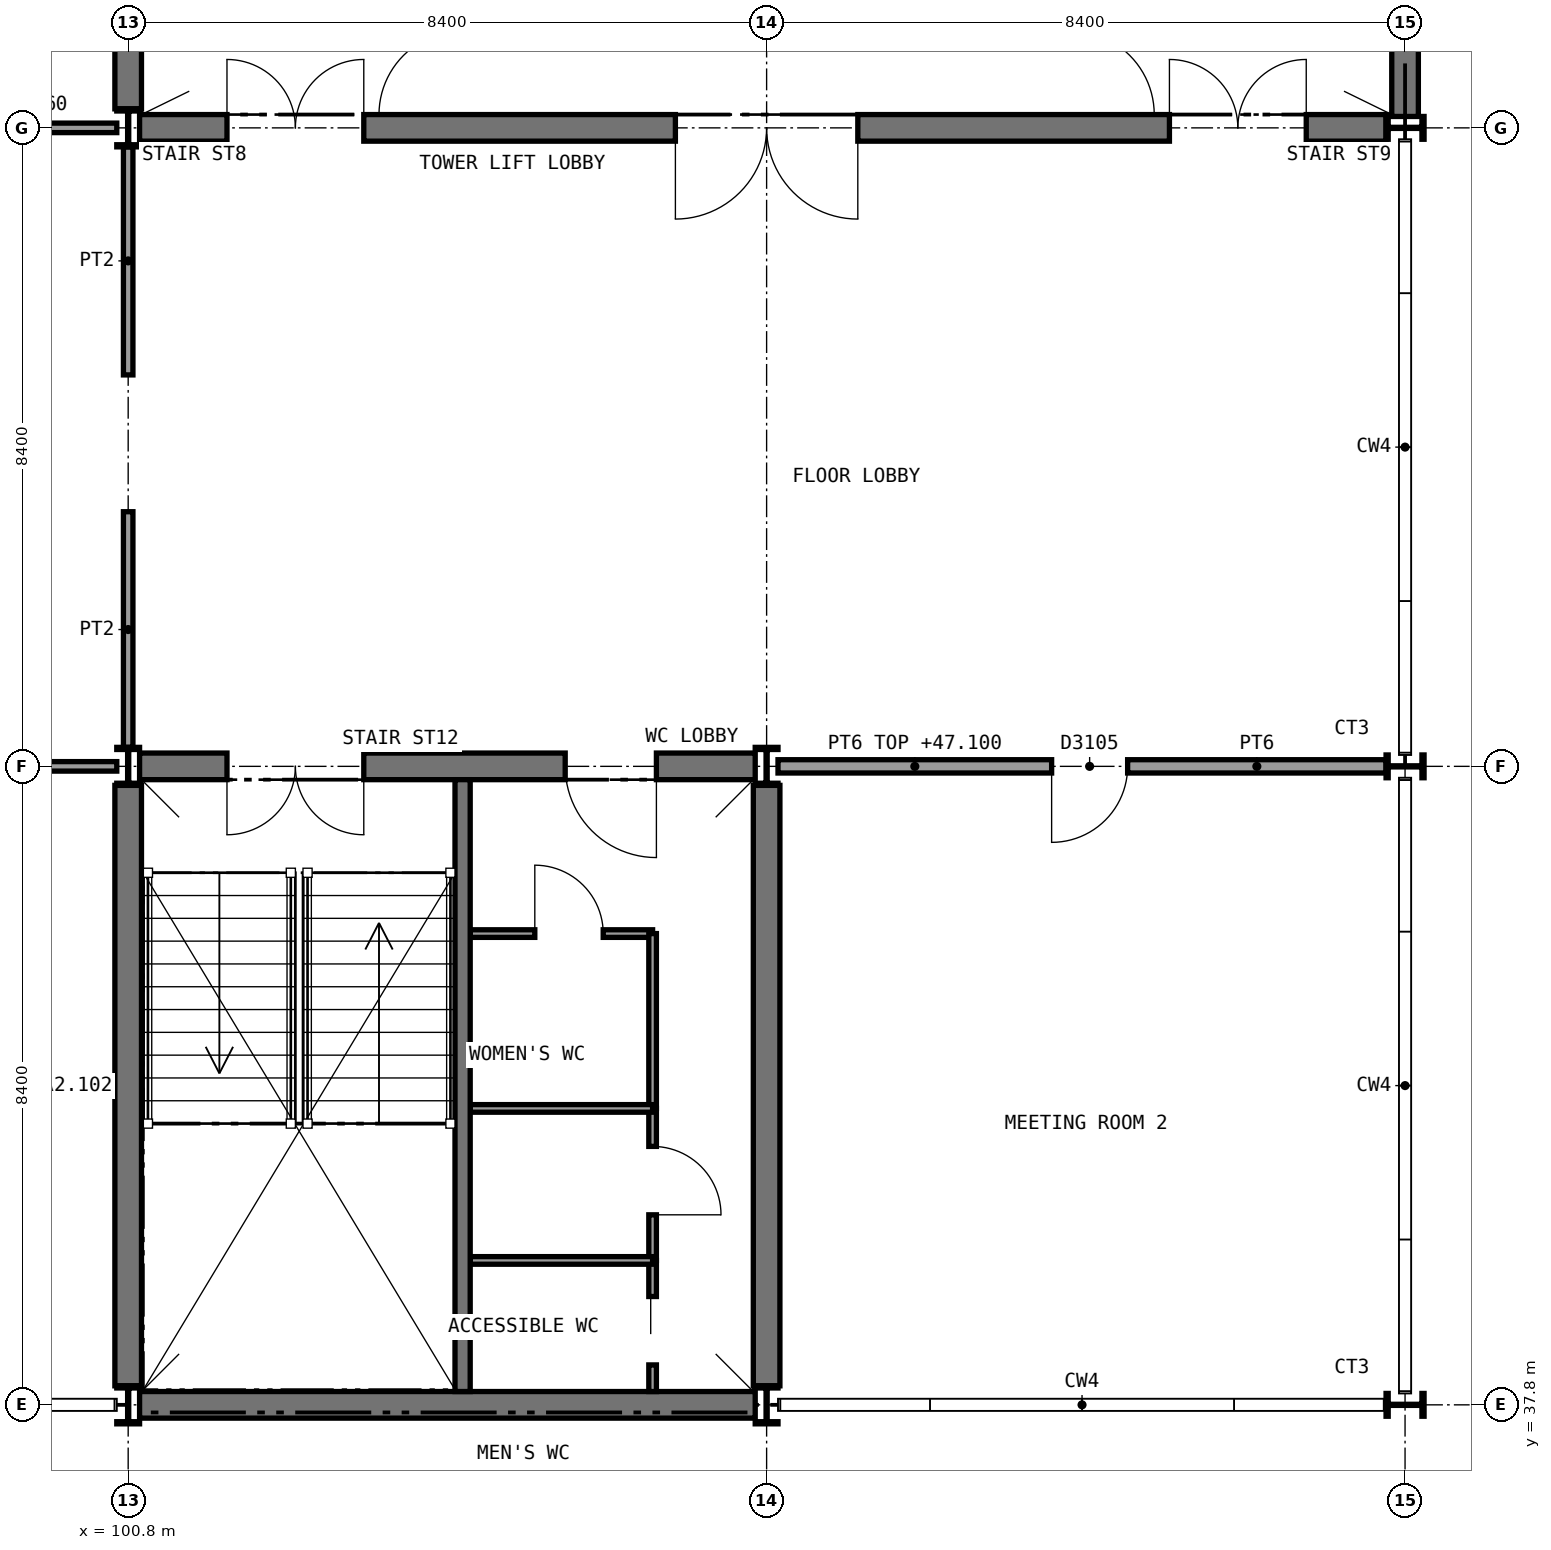
"""IFC4 building model, lengths in metres.
Left out: names, types, materials, properties, quantities, classifications, styles, units other than length and angle.
Written with IfcOpenShell. Run it as: python <this file> out.ifc"""

import sys

from ifc_helpers import new_model, si_unit, direction, frame, frame_2d, origin, origin_2d, place, context, subcontext, project, spatial, rectangle, i_section, extrude, element, fill, save


model = new_model("IFC4")
c1 = context("Model", 3, precision=1e-05, world=origin(), true_north=direction((0.0, 1.0)))
c2 = subcontext(c1, "Body", "Model", "MODEL_VIEW")
j1 = project(units=[si_unit("LENGTHUNIT", "METRE"), si_unit("PLANEANGLEUNIT", "RADIAN")], contexts=[c1])
p1 = place(None, origin())
s1 = spatial("IfcSite", under=j1, at=p1, CompositionType="ELEMENT")
p2 = place(p1, origin())
s2 = spatial("IfcBuilding", under=s1, at=p2, CompositionType="ELEMENT")
p3 = place(p2, frame((0.0, 0.0, 43.6)))
s3 = spatial("IfcBuildingStorey", under=s2, at=p3, CompositionType="ELEMENT", Elevation=43.6)
p4 = place(p3, frame((100.95, 54.6, 0.0), z_axis=(0.0, 0.0, 1.0), x_axis=(1.0, 0.0, 0.0)))
e1 = element("IfcWall", 1, at=p4, inside=s3, PredefinedType="SHEAR", context=c2, shape_type="SweptSolid", body=[
    extrude(rectangle(XDim=16.4, YDim=0.35, at=frame_2d((8.2, 0.0))), origin(), (0.0, 0.0, 1.0), 3.85),
])
p5 = place(p4, frame((1.15, 0.0, 0.0)))
e2 = element("IfcOpeningElement", 2, at=p5, cuts=e1, PredefinedType="OPENING", context=c2, shape_type="SweptSolid", body=[
    extrude(rectangle(XDim=1.8, YDim=2.1, at=frame_2d((0.9, 1.05))), frame((0.0, 0.185, 0.0), z_axis=(0.0, -1.0, 0.0), x_axis=(1.0, 0.0, 0.0)), (0.0, 0.0, 1.0), 0.37),
])
p6 = place(p4, frame((13.55, 0.0, 0.0)))
e3 = element("IfcOpeningElement", 3, at=p6, cuts=e1, PredefinedType="OPENING", context=c2, shape_type="SweptSolid", body=[
    extrude(rectangle(XDim=1.8, YDim=2.1, at=frame_2d((0.9, 1.05))), frame((0.0, 0.185, 0.0), z_axis=(0.0, -1.0, 0.0), x_axis=(1.0, 0.0, 0.0)), (0.0, 0.0, 1.0), 0.37),
])
p7 = place(p4, frame((7.05, 0.0, 0.0)))
e4 = element("IfcOpeningElement", 4, at=p7, cuts=e1, PredefinedType="OPENING", context=c2, shape_type="SweptSolid", body=[
    extrude(rectangle(XDim=2.4, YDim=2.4, at=frame_2d((1.2, 1.2))), frame((0.0, 0.185, 0.0), z_axis=(0.0, -1.0, 0.0), x_axis=(1.0, 0.0, 0.0)), (0.0, 0.0, 1.0), 0.37),
])
p8 = place(p3, frame((100.8, 54.85, 0.0), z_axis=(0.0, 0.0, 1.0), x_axis=(0.0, 1.0, 0.0)))
e5 = element("IfcWall", 5, at=p8, inside=s3, PredefinedType="SHEAR", context=c2, shape_type="SweptSolid", body=[
    extrude(rectangle(XDim=7.9, YDim=0.35, at=frame_2d((3.95, 0.0))), origin(), (0.0, 0.0, 1.0), 3.85),
])
for number, where, z_axis, x_axis in (
    (6, (117.6, 54.75, 0.0), (0.0, 0.0, 1.0), (0.0, 1.0, 0.0)),
    (7, (100.95, 37.8, 0.0), (0.0, 0.0, 1.0), (1.0, 0.0, 0.0)),
):
    element("IfcWall", number, at=place(p3, frame(where, z_axis=z_axis, x_axis=x_axis)), inside=s3, PredefinedType="SHEAR", context=c2, shape_type="SweptSolid", body=[
        extrude(rectangle(XDim=8.1, YDim=0.35, at=frame_2d((4.05, 0.0))), origin(), (0.0, 0.0, 1.0), 3.85),
    ])
p9 = place(p3, frame((100.95, 46.2, 0.0), z_axis=(0.0, 0.0, 1.0), x_axis=(1.0, 0.0, 0.0)))
e8 = element("IfcWall", 8, at=p9, inside=s3, PredefinedType="SHEAR", context=c2, shape_type="SweptSolid", body=[
    extrude(rectangle(XDim=8.1, YDim=0.35, at=frame_2d((4.05, 0.0))), origin(), (0.0, 0.0, 1.0), 3.85),
])
p10 = place(p9, frame((1.15, 0.0, 0.0)))
e9 = element("IfcOpeningElement", 9, at=p10, cuts=e8, PredefinedType="OPENING", context=c2, shape_type="SweptSolid", body=[
    extrude(rectangle(XDim=1.8, YDim=2.1, at=frame_2d((0.9, 1.05))), frame((0.0, 0.185, 0.0), z_axis=(0.0, -1.0, 0.0), x_axis=(1.0, 0.0, 0.0)), (0.0, 0.0, 1.0), 0.37),
])
p11 = place(p9, frame((5.6, 0.0, 0.0)))
e10 = element("IfcOpeningElement", 10, at=p11, cuts=e8, PredefinedType="OPENING", context=c2, shape_type="SweptSolid", body=[
    extrude(rectangle(XDim=1.2, YDim=2.1, at=frame_2d((0.6, 1.05))), frame((0.0, 0.185, 0.0), z_axis=(0.0, -1.0, 0.0), x_axis=(1.0, 0.0, 0.0)), (0.0, 0.0, 1.0), 0.37),
])
for number, where, z_axis, x_axis in (
    (11, (100.8, 38.05, 0.0), (0.0, 0.0, 1.0), (0.0, 1.0, 0.0)),
    (12, (109.2, 38.05, 0.0), (0.0, 0.0, 1.0), (0.0, 1.0, 0.0)),
):
    element("IfcWall", number, at=place(p3, frame(where, z_axis=z_axis, x_axis=x_axis)), inside=s3, PredefinedType="SHEAR", context=c2, shape_type="SweptSolid", body=[
        extrude(rectangle(XDim=7.9, YDim=0.35, at=frame_2d((3.95, 0.0))), origin(), (0.0, 0.0, 1.0), 3.85),
    ])
for number, where, z_axis, x_axis in (
    (13, (100.8, 37.8, 0.0), (0.0, 0.0, 1.0), (1.0, 0.0, 0.0)),
    (14, (100.8, 46.2, 0.0), (0.0, 0.0, 1.0), (1.0, 0.0, 0.0)),
    (15, (100.8, 54.6, 0.0), (0.0, 0.0, 1.0), (1.0, 0.0, 0.0)),
    (16, (109.2, 37.8, 0.0), (0.0, 0.0, 1.0), (1.0, 0.0, 0.0)),
    (17, (109.2, 46.2, 0.0), (0.0, 0.0, 1.0), (1.0, 0.0, 0.0)),
    (18, (117.6, 37.8, 0.0), (0.0, 0.0, 1.0), (0.0, 1.0, 0.0)),
    (19, (117.6, 46.2, 0.0), (0.0, 0.0, 1.0), (0.0, 1.0, 0.0)),
    (20, (117.6, 54.6, 0.0), (0.0, 0.0, 1.0), (0.0, 1.0, 0.0)),
):
    element("IfcColumn", number, at=place(p3, frame(where, z_axis=z_axis, x_axis=x_axis)), inside=s3, PredefinedType="COLUMN", context=c2, shape_type="SweptSolid", body=[
        extrude(i_section(OverallWidth=0.3, OverallDepth=0.5, WebThickness=0.014, FlangeThickness=0.028, FilletRadius=0.027, at=origin_2d()), origin(), (0.0, 0.0, 1.0), 4.0),
    ])
p12 = place(p3, frame((105.3, 44.0, 0.0), z_axis=(0.0, 0.0, 1.0), x_axis=(1.0, 0.0, 0.0)))
e21 = element("IfcWall", 21, at=p12, inside=s3, PredefinedType="PARTITIONING", context=c2, shape_type="SweptSolid", body=[
    extrude(rectangle(XDim=2.4, YDim=0.1, at=frame_2d((1.2, 0.0))), origin(), (0.0, 0.0, 1.0), 3.78),
])
p13 = place(p12, frame((0.85, 0.0, 0.0)))
e22 = element("IfcOpeningElement", 22, at=p13, cuts=e21, PredefinedType="OPENING", context=c2, shape_type="SweptSolid", body=[
    extrude(rectangle(XDim=0.9, YDim=2.1, at=frame_2d((0.45, 1.05))), frame((0.0, 0.06, 0.0), z_axis=(0.0, -1.0, 0.0), x_axis=(1.0, 0.0, 0.0)), (0.0, 0.0, 1.0), 0.12),
])
p14 = place(p3, frame((107.7, 41.7, 0.0), z_axis=(0.0, 0.0, 1.0), x_axis=(0.0, 1.0, 0.0)))
e23 = element("IfcWall", 23, at=p14, inside=s3, PredefinedType="PARTITIONING", context=c2, shape_type="SweptSolid", body=[
    extrude(rectangle(XDim=2.3, YDim=0.1, at=frame_2d((1.15, 0.0))), origin(), (0.0, 0.0, 1.0), 3.78),
])
p15 = place(p3, frame((107.7, 39.7, 0.0), z_axis=(0.0, 0.0, 1.0), x_axis=(0.0, 1.0, 0.0)))
e24 = element("IfcWall", 24, at=p15, inside=s3, PredefinedType="PARTITIONING", context=c2, shape_type="SweptSolid", body=[
    extrude(rectangle(XDim=2.0, YDim=0.1, at=frame_2d((1.0, 0.0))), origin(), (0.0, 0.0, 1.0), 3.78),
])
p16 = place(p15, frame((0.6, 0.0, 0.0)))
e25 = element("IfcOpeningElement", 25, at=p16, cuts=e24, PredefinedType="OPENING", context=c2, shape_type="SweptSolid", body=[
    extrude(rectangle(XDim=0.9, YDim=2.1, at=frame_2d((0.45, 1.05))), frame((0.0, 0.06, 0.0), z_axis=(0.0, -1.0, 0.0), x_axis=(1.0, 0.0, 0.0)), (0.0, 0.0, 1.0), 0.12),
])
p17 = place(p3, frame((107.7, 37.975, 0.0), z_axis=(0.0, 0.0, 1.0), x_axis=(0.0, 1.0, 0.0)))
e26 = element("IfcWall", 26, at=p17, inside=s3, PredefinedType="PARTITIONING", context=c2, shape_type="SweptSolid", body=[
    extrude(rectangle(XDim=1.725, YDim=0.1, at=frame_2d((0.862, 0.0))), origin(), (0.0, 0.0, 1.0), 3.78),
])
p18 = place(p17, frame((0.35, 0.0, 0.0)))
e27 = element("IfcOpeningElement", 27, at=p18, cuts=e26, PredefinedType="OPENING", context=c2, shape_type="SweptSolid", body=[
    extrude(rectangle(XDim=0.9, YDim=2.1, at=frame_2d((0.45, 1.05))), frame((0.0, 0.06, 0.0), z_axis=(0.0, -1.0, 0.0), x_axis=(1.0, 0.0, 0.0)), (0.0, 0.0, 1.0), 0.12),
])
for number, where, z_axis, x_axis in (
    (28, (105.3, 41.7, 0.0), (0.0, 0.0, 1.0), (1.0, 0.0, 0.0)),
    (29, (105.3, 39.7, 0.0), (0.0, 0.0, 1.0), (1.0, 0.0, 0.0)),
):
    element("IfcWall", number, at=place(p3, frame(where, z_axis=z_axis, x_axis=x_axis)), inside=s3, PredefinedType="PARTITIONING", context=c2, shape_type="SweptSolid", body=[
        extrude(rectangle(XDim=2.4, YDim=0.1, at=frame_2d((1.2, 0.0))), origin(), (0.0, 0.0, 1.0), 3.78),
    ])
p19 = place(p3, frame((92.55, 46.2, 0.0), z_axis=(0.0, 0.0, 1.0), x_axis=(1.0, 0.0, 0.0)))
e30 = element("IfcWall", 30, at=p19, inside=s3, PredefinedType="PARTITIONING", context=c2, shape_type="SweptSolid", body=[
    extrude(rectangle(XDim=8.1, YDim=0.125, at=frame_2d((4.05, 0.0))), origin(), (0.0, 0.0, 1.0), 3.5),
])
p20 = place(p19, frame((3.1, 0.0, 0.0)))
e31 = element("IfcOpeningElement", 31, at=p20, cuts=e30, PredefinedType="OPENING", context=c2, shape_type="SweptSolid", body=[
    extrude(rectangle(XDim=1.8, YDim=2.1, at=frame_2d((0.9, 1.05))), frame((0.0, 0.073, 0.0), z_axis=(0.0, -1.0, 0.0), x_axis=(1.0, 0.0, 0.0)), (0.0, 0.0, 1.0), 0.145),
])
p21 = place(p3, frame((109.35, 46.2, 0.0), z_axis=(0.0, 0.0, 1.0), x_axis=(1.0, 0.0, 0.0)))
e32 = element("IfcWall", 32, at=p21, inside=s3, PredefinedType="PARTITIONING", context=c2, shape_type="SweptSolid", body=[
    extrude(rectangle(XDim=8.0, YDim=0.175, at=frame_2d((4.0, 0.0))), origin(), (0.0, 0.0, 1.0), 3.5),
])
p22 = place(p21, frame((3.6, 0.0, 0.0)))
e33 = element("IfcOpeningElement", 33, at=p22, cuts=e32, PredefinedType="OPENING", context=c2, shape_type="SweptSolid", body=[
    extrude(rectangle(XDim=1.0, YDim=2.1, at=frame_2d((0.5, 1.05))), frame((0.0, 0.098, 0.0), z_axis=(0.0, -1.0, 0.0), x_axis=(1.0, 0.0, 0.0)), (0.0, 0.0, 1.0), 0.195),
])
p23 = place(p3, frame((100.8, 46.45, 0.0), z_axis=(0.0, 0.0, 1.0), x_axis=(0.0, 1.0, 0.0)))
e34 = element("IfcWall", 34, at=p23, inside=s3, PredefinedType="PARTITIONING", context=c2, shape_type="SweptSolid", body=[
    extrude(rectangle(XDim=3.1, YDim=0.125, at=frame_2d((1.55, 0.0))), origin(), (0.0, 0.0, 1.0), 3.5),
])
p24 = place(p3, frame((100.8, 51.35, 0.0), z_axis=(0.0, 0.0, 1.0), x_axis=(0.0, 1.0, 0.0)))
e35 = element("IfcWall", 35, at=p24, inside=s3, PredefinedType="PARTITIONING", context=c2, shape_type="SweptSolid", body=[
    extrude(rectangle(XDim=3.0, YDim=0.125, at=frame_2d((1.5, 0.0))), origin(), (0.0, 0.0, 1.0), 3.5),
])
p25 = place(p3, frame((92.55, 54.6, 0.0), z_axis=(0.0, 0.0, 1.0), x_axis=(1.0, 0.0, 0.0)))
e36 = element("IfcWall", 36, at=p25, inside=s3, PredefinedType="PARTITIONING", context=c2, shape_type="SweptSolid", body=[
    extrude(rectangle(XDim=8.1, YDim=0.125, at=frame_2d((4.05, 0.0))), origin(), (0.0, 0.0, 1.0), 3.56),
])
p26 = place(p25, frame((3.6, 0.0, 0.0)))
e37 = element("IfcOpeningElement", 37, at=p26, cuts=e36, PredefinedType="OPENING", context=c2, shape_type="SweptSolid", body=[
    extrude(rectangle(XDim=0.9, YDim=2.1, at=frame_2d((0.45, 1.05))), frame((0.0, 0.073, 0.0), z_axis=(0.0, -1.0, 0.0), x_axis=(1.0, 0.0, 0.0)), (0.0, 0.0, 1.0), 0.145),
])
p27 = place(p3, frame((105.2, 62.825, 0.0), z_axis=(0.0, 0.0, 1.0), x_axis=(0.0, -1.0, 0.0)))
e38 = element("IfcWall", 38, at=p27, inside=s3, PredefinedType="SHEAR", context=c2, shape_type="SweptSolid", body=[
    extrude(rectangle(XDim=8.05, YDim=0.2, at=frame_2d((4.025, 0.0))), origin(), (0.0, 0.0, 1.0), 3.85),
])
p28 = place(p27, frame((6.95, 0.0, 0.0)))
e39 = element("IfcOpeningElement", 39, at=p28, cuts=e38, PredefinedType="OPENING", context=c2, shape_type="SweptSolid", body=[
    extrude(rectangle(XDim=1.11, YDim=2.1, at=frame_2d((0.555, 1.05))), frame((0.0, 0.11, 0.0), z_axis=(0.0, -1.0, 0.0), x_axis=(1.0, 0.0, 0.0)), (0.0, 0.0, 1.0), 0.22),
])
p29 = place(p3, frame((113.2, 62.825, 0.0), z_axis=(0.0, 0.0, 1.0), x_axis=(0.0, -1.0, 0.0)))
e40 = element("IfcWall", 40, at=p29, inside=s3, PredefinedType="SHEAR", context=c2, shape_type="SweptSolid", body=[
    extrude(rectangle(XDim=8.05, YDim=0.2, at=frame_2d((4.025, 0.0))), origin(), (0.0, 0.0, 1.0), 3.85),
])
p30 = place(p29, frame((6.95, 0.0, 0.0)))
e41 = element("IfcOpeningElement", 41, at=p30, cuts=e40, PredefinedType="OPENING", context=c2, shape_type="SweptSolid", body=[
    extrude(rectangle(XDim=1.11, YDim=2.1, at=frame_2d((0.555, 1.05))), frame((0.0, 0.11, 0.0), z_axis=(0.0, -1.0, 0.0), x_axis=(1.0, 0.0, 0.0)), (0.0, 0.0, 1.0), 0.22),
])
p31 = place(p3, frame((105.2, 37.975, 0.0), z_axis=(0.0, 0.0, 1.0), x_axis=(0.0, 1.0, 0.0)))
e42 = element("IfcWall", 42, at=p31, inside=s3, PredefinedType="SHEAR", context=c2, shape_type="SweptSolid", body=[
    extrude(rectangle(XDim=8.05, YDim=0.2, at=frame_2d((4.025, 0.0))), origin(), (0.0, 0.0, 1.0), 3.85),
])
p32 = place(p13, origin())
e43 = element("IfcDoor", 43, at=p32, inside=s3, OperationType="SINGLE_SWING_LEFT", PredefinedType="DOOR", context=c2, shape_type="SweptSolid", body=[
    extrude(rectangle(XDim=0.9, YDim=2.1, at=frame_2d((0.45, 1.05))), frame((0.0, 0.025, 0.0), z_axis=(0.0, -1.0, 0.0), x_axis=(1.0, 0.0, 0.0)), (0.0, 0.0, 1.0), 0.05),
])
fill(e22, e43)
p33 = place(p16, frame((0.9, 0.0, 0.0), z_axis=(0.0, 0.0, 1.0), x_axis=(-1.0, 0.0, 0.0)))
e44 = element("IfcDoor", 44, at=p33, inside=s3, OperationType="SINGLE_SWING_RIGHT", PredefinedType="DOOR", context=c2, shape_type="SweptSolid", body=[
    extrude(rectangle(XDim=0.9, YDim=2.1, at=frame_2d((0.45, 1.05))), frame((0.0, 0.025, 0.0), z_axis=(0.0, -1.0, 0.0), x_axis=(1.0, 0.0, 0.0)), (0.0, 0.0, 1.0), 0.05),
])
fill(e25, e44)
p34 = place(p18, origin())
e45 = element("IfcDoor", 45, at=p34, inside=s3, OperationType="SLIDING_TO_RIGHT", PredefinedType="DOOR", context=c2, shape_type="SweptSolid", body=[
    extrude(rectangle(XDim=0.9, YDim=2.1, at=frame_2d((0.45, 1.05))), frame((0.0, 0.025, 0.0), z_axis=(0.0, -1.0, 0.0), x_axis=(1.0, 0.0, 0.0)), (0.0, 0.0, 1.0), 0.05),
])
fill(e27, e45)
p35 = place(p22, frame((1.0, 0.0, 0.0), z_axis=(0.0, 0.0, 1.0), x_axis=(-1.0, 0.0, 0.0)))
e46 = element("IfcDoor", 46, at=p35, inside=s3, OperationType="SINGLE_SWING_RIGHT", PredefinedType="DOOR", context=c2, shape_type="SweptSolid", body=[
    extrude(rectangle(XDim=1.0, YDim=2.1, at=frame_2d((0.5, 1.05))), frame((0.0, 0.025, 0.0), z_axis=(0.0, -1.0, 0.0), x_axis=(1.0, 0.0, 0.0)), (0.0, 0.0, 1.0), 0.05),
])
fill(e33, e46)
p36 = place(p28, frame((1.1, 0.0, 0.0), z_axis=(0.0, 0.0, 1.0), x_axis=(-1.0, 0.0, 0.0)))
e47 = element("IfcDoor", 47, at=p36, inside=s3, OperationType="SINGLE_SWING_LEFT", PredefinedType="DOOR", context=c2, shape_type="SweptSolid", body=[
    extrude(rectangle(XDim=1.1, YDim=2.1, at=frame_2d((0.55, 1.05))), frame((0.0, 0.025, 0.0), z_axis=(0.0, -1.0, 0.0), x_axis=(1.0, 0.0, 0.0)), (0.0, 0.0, 1.0), 0.05),
])
fill(e39, e47)
p37 = place(p30, origin())
e48 = element("IfcDoor", 48, at=p37, inside=s3, OperationType="SINGLE_SWING_RIGHT", PredefinedType="DOOR", context=c2, shape_type="SweptSolid", body=[
    extrude(rectangle(XDim=1.1, YDim=2.1, at=frame_2d((0.55, 1.05))), frame((0.0, 0.025, 0.0), z_axis=(0.0, -1.0, 0.0), x_axis=(1.0, 0.0, 0.0)), (0.0, 0.0, 1.0), 0.05),
])
fill(e41, e48)
p38 = place(p5, origin())
e49 = element("IfcDoor", 49, at=p38, inside=s3, OperationType="DOUBLE_DOOR_SINGLE_SWING", PredefinedType="DOOR", context=c2, shape_type="SweptSolid", body=[
    extrude(rectangle(XDim=1.8, YDim=2.1, at=frame_2d((0.9, 1.05))), frame((0.0, 0.025, 0.0), z_axis=(0.0, -1.0, 0.0), x_axis=(1.0, 0.0, 0.0)), (0.0, 0.0, 1.0), 0.05),
])
fill(e2, e49)
p39 = place(p6, origin())
e50 = element("IfcDoor", 50, at=p39, inside=s3, OperationType="DOUBLE_DOOR_SINGLE_SWING", PredefinedType="DOOR", context=c2, shape_type="SweptSolid", body=[
    extrude(rectangle(XDim=1.8, YDim=2.1, at=frame_2d((0.9, 1.05))), frame((0.0, 0.025, 0.0), z_axis=(0.0, -1.0, 0.0), x_axis=(1.0, 0.0, 0.0)), (0.0, 0.0, 1.0), 0.05),
])
fill(e3, e50)
p40 = place(p7, frame((2.4, 0.0, 0.0), z_axis=(0.0, 0.0, 1.0), x_axis=(-1.0, 0.0, 0.0)))
e51 = element("IfcDoor", 51, at=p40, inside=s3, OperationType="DOUBLE_DOOR_SINGLE_SWING", PredefinedType="DOOR", context=c2, shape_type="SweptSolid", body=[
    extrude(rectangle(XDim=2.4, YDim=2.4, at=frame_2d((1.2, 1.2))), frame((0.0, 0.025, 0.0), z_axis=(0.0, -1.0, 0.0), x_axis=(1.0, 0.0, 0.0)), (0.0, 0.0, 1.0), 0.05),
])
fill(e4, e51)
p41 = place(p10, frame((1.8, 0.0, 0.0), z_axis=(0.0, 0.0, 1.0), x_axis=(-1.0, 0.0, 0.0)))
e52 = element("IfcDoor", 52, at=p41, inside=s3, OperationType="DOUBLE_DOOR_SINGLE_SWING", PredefinedType="DOOR", context=c2, shape_type="SweptSolid", body=[
    extrude(rectangle(XDim=1.8, YDim=2.1, at=frame_2d((0.9, 1.05))), frame((0.0, 0.025, 0.0), z_axis=(0.0, -1.0, 0.0), x_axis=(1.0, 0.0, 0.0)), (0.0, 0.0, 1.0), 0.05),
])
fill(e9, e52)
p42 = place(p11, frame((1.2, 0.0, 0.0), z_axis=(0.0, 0.0, 1.0), x_axis=(-1.0, 0.0, 0.0)))
e53 = element("IfcDoor", 53, at=p42, inside=s3, OperationType="SINGLE_SWING_LEFT", PredefinedType="DOOR", context=c2, shape_type="SweptSolid", body=[
    extrude(rectangle(XDim=1.2, YDim=2.1, at=frame_2d((0.6, 1.05))), frame((0.0, 0.025, 0.0), z_axis=(0.0, -1.0, 0.0), x_axis=(1.0, 0.0, 0.0)), (0.0, 0.0, 1.0), 0.05),
])
fill(e10, e53)
save(model, sys.argv[1])
